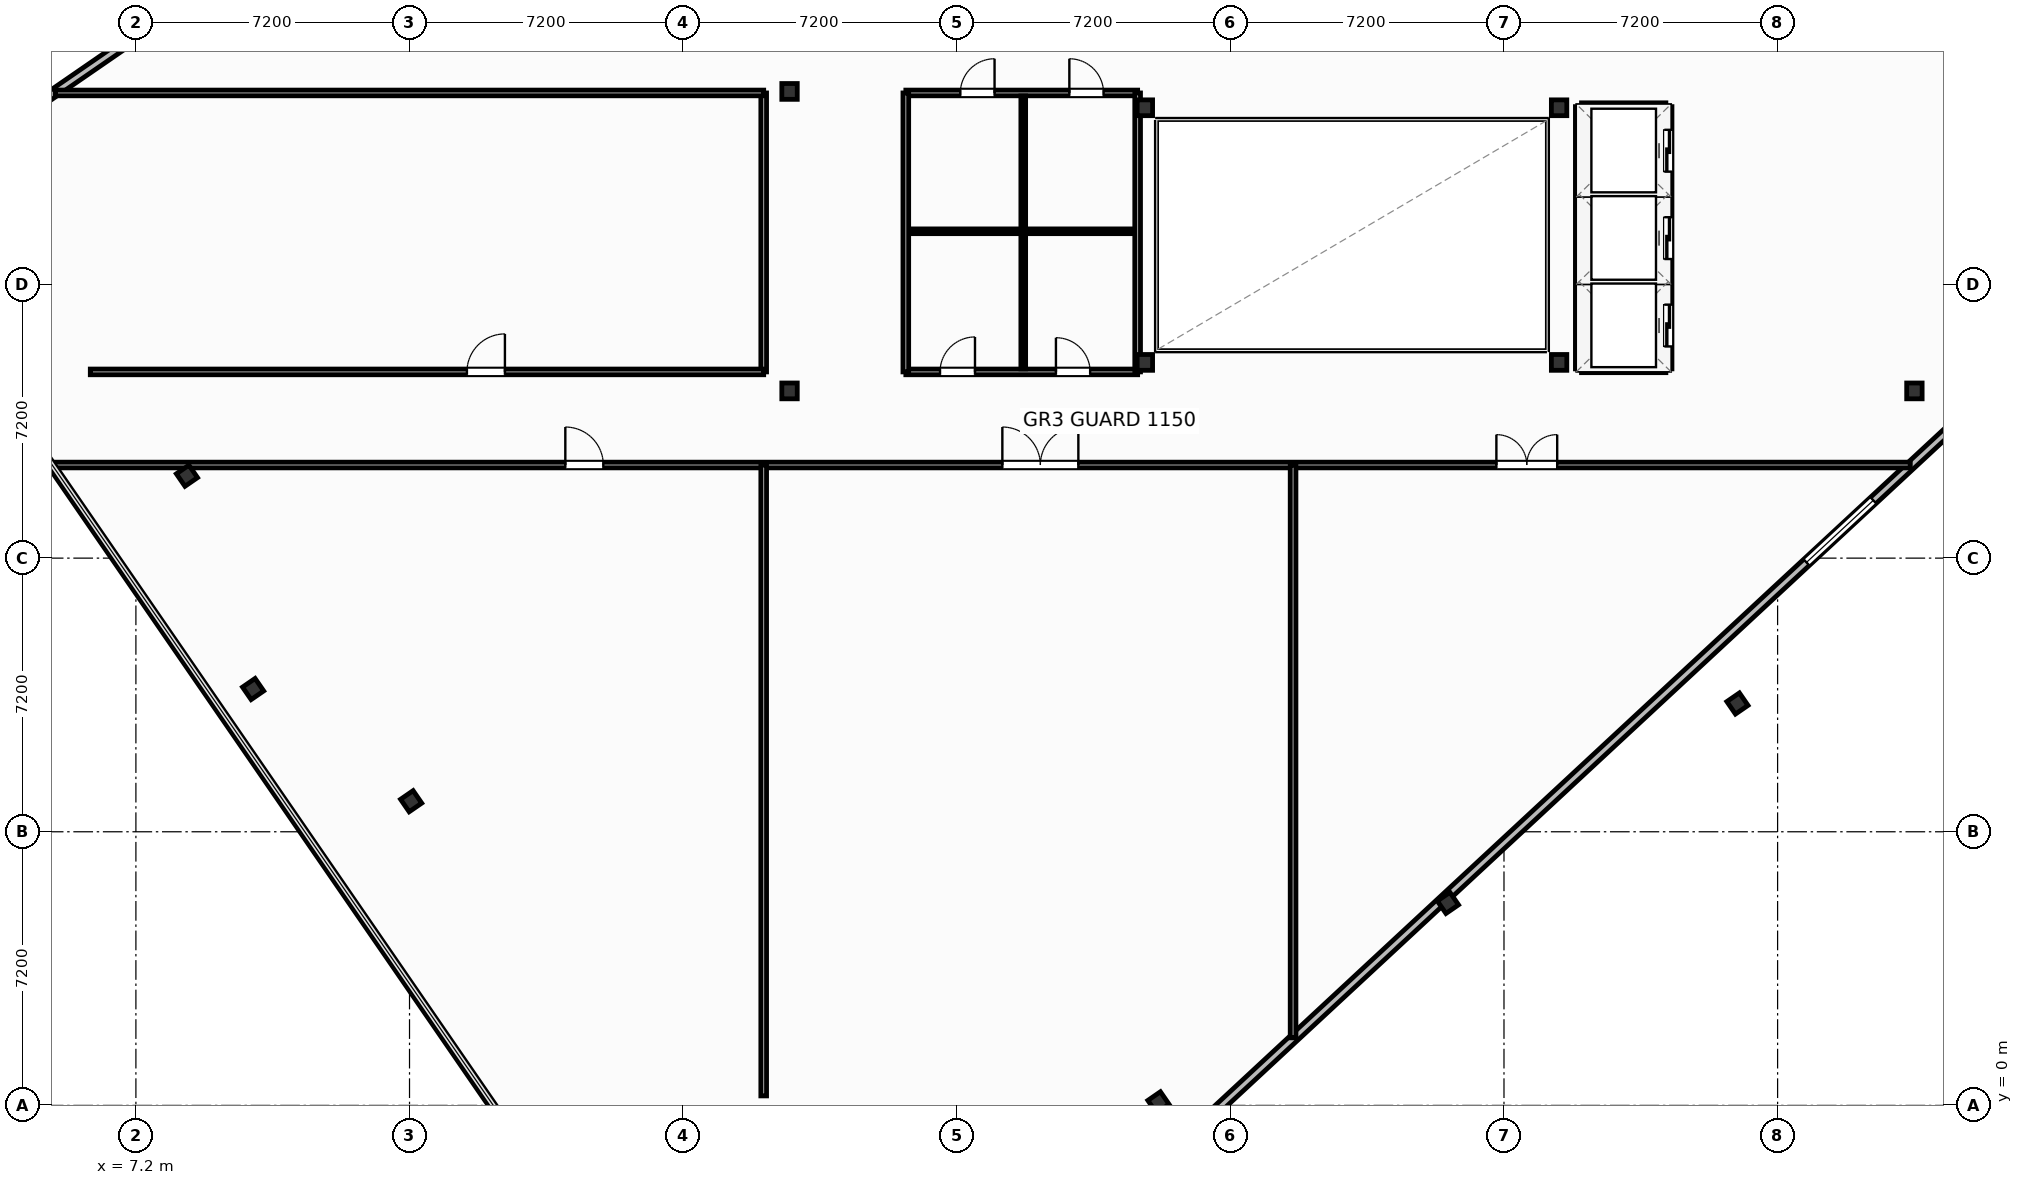
"""IFC4 building model, lengths in metres.
Left out: names, types, materials, properties, quantities, classifications, styles, units other than length and angle.
Written with IfcOpenShell. Run it as: python <this file> out.ifc"""

import sys

from ifc_helpers import new_model, si_unit, direction, frame, frame_2d, origin, origin_2d, place, context, subcontext, project, spatial, rectangle, i_section, extrude, element, fill, save


model = new_model("IFC4")
c1 = context("Model", 3, precision=1e-05, world=origin(), true_north=direction((0.0, 1.0)))
c2 = subcontext(c1, "Body", "Model", "MODEL_VIEW")
j1 = project(units=[si_unit("LENGTHUNIT", "METRE"), si_unit("PLANEANGLEUNIT", "RADIAN")], contexts=[c1])
p1 = place(None, origin())
s1 = spatial("IfcSite", under=j1, at=p1, CompositionType="ELEMENT")
p2 = place(p1, origin())
s2 = spatial("IfcBuilding", under=s1, at=p2, CompositionType="ELEMENT")
p3 = place(p2, frame((0.0, 0.0, 291.5)))
s3 = spatial("IfcBuildingStorey", under=s2, at=p3, CompositionType="ELEMENT", Elevation=291.5)
for number, where, z_axis, x_axis in (
    (1, (33.75, 19.55, 0.0), (0.0, 0.0, 1.0), (1.0, 0.0, 0.0)),
    (2, (44.65, 19.55, 0.0), (0.0, 0.0, 1.0), (1.0, 0.0, 0.0)),
    (3, (33.75, 26.25, 0.0), (0.0, 0.0, 1.0), (1.0, 0.0, 0.0)),
    (4, (44.65, 26.25, 0.0), (0.0, 0.0, 1.0), (1.0, 0.0, 0.0)),
    (5, (24.4, 18.8, 0.0), (0.0, 0.0, 1.0), (1.0, 0.0, 0.0)),
    (6, (24.4, 26.68, 0.0), (0.0, 0.0, 1.0), (1.0, 0.0, 0.0)),
    (7, (54.0, 18.8, 0.0), (0.0, 0.0, 1.0), (1.0, 0.0, 0.0)),
):
    element("IfcColumn", number, at=place(p3, frame(where, z_axis=z_axis, x_axis=x_axis)), inside=s3, PredefinedType="COLUMN", context=c2, shape_type="SweptSolid", body=[
        extrude(i_section(OverallWidth=0.406, OverallDepth=0.416, WebThickness=0.03, FlangeThickness=0.048, FilletRadius=0.025, at=origin_2d()), origin(), (0.0, 0.0, 1.0), 4.8),
    ])
for number, where, z_axis, x_axis in (
    (8, (34.107, 0.081, 0.0), (0.0, 0.0, 1.0), (0.824, 0.567, 0.0)),
    (9, (41.725, 5.328, 0.0), (0.0, 0.0, 1.0), (0.824, 0.567, 0.0)),
    (10, (49.343, 10.575, 0.0), (0.0, 0.0, 1.0), (0.824, 0.567, 0.0)),
    (11, (8.543, 16.569, 0.0), (0.0, 0.0, 1.0), (0.824, 0.567, 0.0)),
    (12, (10.284, 10.956, 0.0), (0.0, 0.0, 1.0), (0.824, 0.567, 0.0)),
    (13, (14.443, 8.004, 0.0), (0.0, 0.0, 1.0), (0.824, 0.567, 0.0)),
):
    element("IfcColumn", number, at=place(p3, frame(where, z_axis=z_axis, x_axis=x_axis)), inside=s3, PredefinedType="COLUMN", context=c2, shape_type="SweptSolid", body=[
        extrude(i_section(OverallWidth=0.401, OverallDepth=0.399, WebThickness=0.025, FlangeThickness=0.04, FilletRadius=0.022, at=origin_2d()), origin(), (0.0, 0.0, 1.0), 4.8),
    ])
p4 = place(p3, frame((27.693, -7.489, 0.0), z_axis=(0.0, 0.0, 1.0), x_axis=(0.733009701217, 0.680218184057, 0.0)))
e14 = element("IfcWall", 14, at=p4, inside=s3, PredefinedType="SOLIDWALL", context=c2, shape_type="SweptSolid", body=[
    extrude(rectangle(XDim=66.428, YDim=0.22, at=frame_2d((33.214, 0.0))), origin(), (0.0, 0.0, 1.0), 2.265),
])
p5 = place(p4, frame((32.014, 0.0, 0.8)))
e15 = element("IfcOpeningElement", 15, at=p5, cuts=e14, PredefinedType="OPENING", context=c2, shape_type="SweptSolid", body=[
    extrude(rectangle(XDim=2.4, YDim=1.385, at=frame_2d((1.2, 0.692))), frame((0.0, 0.12, 0.0), z_axis=(0.0, -1.0, 0.0), x_axis=(1.0, 0.0, 0.0)), (0.0, 0.0, 1.0), 0.24),
])
p6 = place(p3, frame((50.695, 58.086, 0.0), z_axis=(0.0, 0.0, 1.0), x_axis=(-0.823531024939, -0.567271232272, 0.0)))
e16 = element("IfcWall", 16, at=p6, inside=s3, PredefinedType="SOLIDWALL", context=c2, shape_type="SweptSolid", body=[
    extrude(rectangle(XDim=56.157, YDim=0.22, at=frame_2d((28.079, 0.0))), origin(), (0.0, 0.0, 1.0), 3.76),
])
p7 = place(p6, frame((26.879, 0.0, 0.8)))
e17 = element("IfcOpeningElement", 17, at=p7, cuts=e16, PredefinedType="OPENING", context=c2, shape_type="SweptSolid", body=[
    extrude(rectangle(XDim=2.4, YDim=1.85, at=frame_2d((1.2, 0.925))), frame((0.0, 0.12, 0.0), z_axis=(0.0, -1.0, 0.0), x_axis=(1.0, 0.0, 0.0)), (0.0, 0.0, 1.0), 0.24),
])
p8 = place(p3, frame((27.46, 26.64, 0.0), z_axis=(0.0, 0.0, 1.0), x_axis=(1.0, 0.0, 0.0)))
e18 = element("IfcWall", 18, at=p8, inside=s3, PredefinedType="PARTITIONING", context=c2, shape_type="SweptSolid", body=[
    extrude(rectangle(XDim=6.1, YDim=0.15, at=frame_2d((3.05, 0.0))), origin(), (0.0, 0.0, 1.0), 3.692),
])
p9 = place(p8, frame((4.303, 0.0, 0.0)))
e19 = element("IfcOpeningElement", 19, at=p9, cuts=e18, PredefinedType="OPENING", context=c2, shape_type="SweptSolid", body=[
    extrude(rectangle(XDim=0.9, YDim=2.05, at=frame_2d((0.45, 1.025))), frame((0.0, 0.085, 0.0), z_axis=(0.0, -1.0, 0.0), x_axis=(1.0, 0.0, 0.0)), (0.0, 0.0, 1.0), 0.17),
])
p10 = place(p8, frame((1.435, 0.0, 0.0)))
e20 = element("IfcOpeningElement", 20, at=p10, cuts=e18, PredefinedType="OPENING", context=c2, shape_type="SweptSolid", body=[
    extrude(rectangle(XDim=0.9, YDim=2.05, at=frame_2d((0.45, 1.025))), frame((0.0, 0.085, 0.0), z_axis=(0.0, -1.0, 0.0), x_axis=(1.0, 0.0, 0.0)), (0.0, 0.0, 1.0), 0.17),
])
p11 = place(p3, frame((27.46, 19.3, 0.0), z_axis=(0.0, 0.0, 1.0), x_axis=(1.0, 0.0, 0.0)))
e21 = element("IfcWall", 21, at=p11, inside=s3, PredefinedType="PARTITIONING", context=c2, shape_type="SweptSolid", body=[
    extrude(rectangle(XDim=6.1, YDim=0.15, at=frame_2d((3.05, 0.0))), origin(), (0.0, 0.0, 1.0), 3.692),
])
p12 = place(p11, frame((0.9, 0.0, 0.0)))
e22 = element("IfcOpeningElement", 22, at=p12, cuts=e21, PredefinedType="OPENING", context=c2, shape_type="SweptSolid", body=[
    extrude(rectangle(XDim=0.92, YDim=2.05, at=frame_2d((0.46, 1.025))), frame((0.0, 0.085, 0.0), z_axis=(0.0, -1.0, 0.0), x_axis=(1.0, 0.0, 0.0)), (0.0, 0.0, 1.0), 0.17),
])
p13 = place(p11, frame((3.95, 0.0, 0.0)))
e23 = element("IfcOpeningElement", 23, at=p13, cuts=e21, PredefinedType="OPENING", context=c2, shape_type="SweptSolid", body=[
    extrude(rectangle(XDim=0.9, YDim=2.05, at=frame_2d((0.45, 1.025))), frame((0.0, 0.085, 0.0), z_axis=(0.0, -1.0, 0.0), x_axis=(1.0, 0.0, 0.0)), (0.0, 0.0, 1.0), 0.17),
])
p14 = place(p3, frame((30.55, 19.38, 0.0), z_axis=(0.0, 0.0, 1.0), x_axis=(0.0, 1.0, 0.0)))
e24 = element("IfcWall", 24, at=p14, inside=s3, PredefinedType="PARTITIONING", context=c2, shape_type="SweptSolid", body=[
    extrude(rectangle(XDim=7.18, YDim=0.125, at=frame_2d((3.59, 0.0))), origin(), (0.0, 0.0, 1.0), 4.48),
])
p15 = place(p3, frame((27.52, 23.0, 0.0), z_axis=(0.0, 0.0, 1.0), x_axis=(1.0, 0.0, 0.0)))
e25 = element("IfcWall", 25, at=p15, inside=s3, PredefinedType="PARTITIONING", context=c2, shape_type="SweptSolid", body=[
    extrude(rectangle(XDim=6.0, YDim=0.125, at=frame_2d((3.0, 0.0))), origin(), (0.0, 0.0, 1.0), 4.48),
])
p16 = place(p3, frame((27.46, 19.3, 0.0), z_axis=(0.0, 0.0, 1.0), x_axis=(0.0, 1.0, 0.0)))
e26 = element("IfcWall", 26, at=p16, inside=s3, PredefinedType="PARTITIONING", context=c2, shape_type="SweptSolid", body=[
    extrude(rectangle(XDim=7.34, YDim=0.15, at=frame_2d((3.67, 0.0))), origin(), (0.0, 0.0, 1.0), 4.48),
])
p17 = place(p3, frame((33.56, 19.3, 0.0), z_axis=(0.0, 0.0, 1.0), x_axis=(0.0, 1.0, 0.0)))
e27 = element("IfcWall", 27, at=p17, inside=s3, PredefinedType="PARTITIONING", context=c2, shape_type="SweptSolid", body=[
    extrude(rectangle(XDim=7.34, YDim=0.15, at=frame_2d((3.67, 0.0))), origin(), (0.0, 0.0, 1.0), 2.265),
])
p18 = place(p3, frame((5.038, 16.85, 0.0), z_axis=(0.0, 0.0, 1.0), x_axis=(1.0, 0.0, 0.0)))
e28 = element("IfcWall", 28, at=p18, inside=s3, PredefinedType="PARTITIONING", context=c2, shape_type="SweptSolid", body=[
    extrude(rectangle(XDim=48.854, YDim=0.15, at=frame_2d((24.427, 0.0))), origin(), (0.0, 0.0, 1.0), 2.265),
])
p19 = place(p18, frame((13.462, 0.0, 0.0)))
e29 = element("IfcOpeningElement", 29, at=p19, cuts=e28, PredefinedType="OPENING", context=c2, shape_type="SweptSolid", body=[
    extrude(rectangle(XDim=1.0, YDim=2.05, at=frame_2d((0.5, 1.025))), frame((0.0, 0.085, 0.0), z_axis=(0.0, -1.0, 0.0), x_axis=(1.0, 0.0, 0.0)), (0.0, 0.0, 1.0), 0.17),
])
p20 = place(p18, frame((24.962, 0.0, 0.0)))
e30 = element("IfcOpeningElement", 30, at=p20, cuts=e28, PredefinedType="OPENING", context=c2, shape_type="SweptSolid", body=[
    extrude(rectangle(XDim=2.0, YDim=2.05, at=frame_2d((1.0, 1.025))), frame((0.0, 0.085, 0.0), z_axis=(0.0, -1.0, 0.0), x_axis=(1.0, 0.0, 0.0)), (0.0, 0.0, 1.0), 0.17),
])
p21 = place(p18, frame((37.962, 0.0, 0.0)))
e31 = element("IfcOpeningElement", 31, at=p21, cuts=e28, PredefinedType="OPENING", context=c2, shape_type="SweptSolid", body=[
    extrude(rectangle(XDim=1.6, YDim=2.05, at=frame_2d((0.8, 1.025))), frame((0.0, 0.085, 0.0), z_axis=(0.0, -1.0, 0.0), x_axis=(1.0, 0.0, 0.0)), (0.0, 0.0, 1.0), 0.17),
])
p22 = place(p3, frame((23.72, 0.25, 0.0), z_axis=(0.0, 0.0, 1.0), x_axis=(0.0, 1.0, 0.0)))
e32 = element("IfcWall", 32, at=p22, inside=s3, PredefinedType="PARTITIONING", context=c2, shape_type="SweptSolid", body=[
    extrude(rectangle(XDim=16.6, YDim=0.15, at=frame_2d((8.3, 0.0))), origin(), (0.0, 0.0, 1.0), 4.48),
])
p23 = place(p3, frame((23.72, 19.3, 0.0), z_axis=(0.0, 0.0, 1.0), x_axis=(0.0, 1.0, 0.0)))
e33 = element("IfcWall", 33, at=p23, inside=s3, PredefinedType="PARTITIONING", context=c2, shape_type="SweptSolid", body=[
    extrude(rectangle(XDim=7.34, YDim=0.15, at=frame_2d((3.67, 0.0))), origin(), (0.0, 0.0, 1.0), 4.48),
])
p24 = place(p3, frame((6.0, 19.3, 0.0), z_axis=(0.0, 0.0, 1.0), x_axis=(1.0, 0.0, 0.0)))
e34 = element("IfcWall", 34, at=p24, inside=s3, PredefinedType="PARTITIONING", context=c2, shape_type="SweptSolid", body=[
    extrude(rectangle(XDim=17.72, YDim=0.15, at=frame_2d((8.86, 0.0))), origin(), (0.0, 0.0, 1.0), 4.48),
])
p25 = place(p24, frame((9.91, 0.0, 0.0)))
e35 = element("IfcOpeningElement", 35, at=p25, cuts=e34, PredefinedType="OPENING", context=c2, shape_type="SweptSolid", body=[
    extrude(rectangle(XDim=1.0, YDim=2.05, at=frame_2d((0.5, 1.025))), frame((0.0, 0.085, 0.0), z_axis=(0.0, -1.0, 0.0), x_axis=(1.0, 0.0, 0.0)), (0.0, 0.0, 1.0), 0.17),
])
p26 = place(p3, frame((37.65, 1.778, 0.0), z_axis=(0.0, 0.0, 1.0), x_axis=(0.0, 1.0, 0.0)))
e36 = element("IfcWall", 36, at=p26, inside=s3, PredefinedType="PARTITIONING", context=c2, shape_type="SweptSolid", body=[
    extrude(rectangle(XDim=15.072, YDim=0.15, at=frame_2d((7.536, 0.0))), origin(), (0.0, 0.0, 1.0), 4.48),
])
p27 = place(p3, frame((5.078, 26.64, 0.0), z_axis=(0.0, 0.0, 1.0), x_axis=(1.0, 0.0, 0.0)))
e37 = element("IfcWall", 37, at=p27, inside=s3, PredefinedType="PARTITIONING", context=c2, shape_type="SweptSolid", body=[
    extrude(rectangle(XDim=18.642, YDim=0.15, at=frame_2d((9.321, 0.0))), origin(), (0.0, 0.0, 1.0), 2.265),
])
for number, where, z_axis, x_axis in (
    (38, (45.24, 21.675, 0.0), (0.0, 0.0, 1.0), (1.0, 0.0, 0.0)),
    (39, (45.24, 23.975, 0.0), (0.0, 0.0, 1.0), (1.0, 0.0, 0.0)),
):
    element("IfcWall", number, at=place(p3, frame(where, z_axis=z_axis, x_axis=x_axis)), inside=s3, PredefinedType="PARTITIONING", context=c2, shape_type="SweptSolid", body=[
        extrude(rectangle(XDim=2.22, YDim=0.2, at=frame_2d((1.11, 0.0))), origin(), (0.0, 0.0, 1.0), 4.48),
    ])
p28 = place(p3, frame((45.24, 19.38, 0.0), z_axis=(0.0, 0.0, 1.0), x_axis=(1.0, 0.0, 0.0)))
e40 = element("IfcWall", 40, at=p28, inside=s3, PredefinedType="PARTITIONING", context=c2, shape_type="SweptSolid", body=[
    extrude(rectangle(XDim=2.22, YDim=0.2, at=frame_2d((1.11, 0.0))), origin(), (0.0, 0.0, 1.0), 3.692),
])
p29 = place(p3, frame((45.24, 26.28, 0.0), z_axis=(0.0, 0.0, 1.0), x_axis=(1.0, 0.0, 0.0)))
e41 = element("IfcWall", 41, at=p29, inside=s3, PredefinedType="PARTITIONING", context=c2, shape_type="SweptSolid", body=[
    extrude(rectangle(XDim=2.22, YDim=0.2, at=frame_2d((1.11, 0.0))), origin(), (0.0, 0.0, 1.0), 4.48),
])
p30 = place(p3, frame((45.18, 19.38, 0.0), z_axis=(0.0, 0.0, 1.0), x_axis=(0.0, 1.0, 0.0)))
e42 = element("IfcWall", 42, at=p30, inside=s3, PredefinedType="PARTITIONING", context=c2, shape_type="SweptSolid", body=[
    extrude(rectangle(XDim=6.9, YDim=0.2, at=frame_2d((3.45, 0.0))), origin(), (0.0, 0.0, 1.0), 4.48),
])
p31 = place(p3, frame((47.52, 19.38, 0.0), z_axis=(0.0, 0.0, 1.0), x_axis=(0.0, 1.0, 0.0)))
e43 = element("IfcWall", 43, at=p31, inside=s3, PredefinedType="PARTITIONING", context=c2, shape_type="SweptSolid", body=[
    extrude(rectangle(XDim=6.9, YDim=0.2, at=frame_2d((3.45, 0.0))), origin(), (0.0, 0.0, 1.0), 4.48),
])
p32 = place(p31, frame((0.59, 0.0, 0.0)))
e44 = element("IfcOpeningElement", 44, at=p32, cuts=e43, PredefinedType="OPENING", context=c2, shape_type="SweptSolid", body=[
    extrude(rectangle(XDim=1.1, YDim=2.15, at=frame_2d((0.55, 1.075))), frame((0.0, 0.11, 0.0), z_axis=(0.0, -1.0, 0.0), x_axis=(1.0, 0.0, 0.0)), (0.0, 0.0, 1.0), 0.22),
])
p33 = place(p31, frame((2.89, 0.0, 0.0)))
e45 = element("IfcOpeningElement", 45, at=p33, cuts=e43, PredefinedType="OPENING", context=c2, shape_type="SweptSolid", body=[
    extrude(rectangle(XDim=1.1, YDim=2.15, at=frame_2d((0.55, 1.075))), frame((0.0, 0.11, 0.0), z_axis=(0.0, -1.0, 0.0), x_axis=(1.0, 0.0, 0.0)), (0.0, 0.0, 1.0), 0.22),
])
p34 = place(p31, frame((5.19, 0.0, 0.0)))
e46 = element("IfcOpeningElement", 46, at=p34, cuts=e43, PredefinedType="OPENING", context=c2, shape_type="SweptSolid", body=[
    extrude(rectangle(XDim=1.1, YDim=2.15, at=frame_2d((0.55, 1.075))), frame((0.0, 0.11, 0.0), z_axis=(0.0, -1.0, 0.0), x_axis=(1.0, 0.0, 0.0)), (0.0, 0.0, 1.0), 0.22),
])
p35 = place(p5, origin())
e47 = element("IfcWindow", 47, at=p35, inside=s3, PartitioningType="SINGLE_PANEL", PredefinedType="WINDOW", context=c2, shape_type="SweptSolid", body=[
    extrude(rectangle(XDim=2.4, YDim=1.385, at=frame_2d((1.2, 0.692))), frame((0.0, 0.03, 0.0), z_axis=(0.0, -1.0, 0.0), x_axis=(1.0, 0.0, 0.0)), (0.0, 0.0, 1.0), 0.06),
])
fill(e15, e47)
p36 = place(p9, origin())
e48 = element("IfcDoor", 48, at=p36, inside=s3, OperationType="SINGLE_SWING_LEFT", PredefinedType="DOOR", context=c2, shape_type="SweptSolid", body=[
    extrude(rectangle(XDim=0.9, YDim=2.05, at=frame_2d((0.45, 1.025))), frame((0.0, 0.025, 0.0), z_axis=(0.0, -1.0, 0.0), x_axis=(1.0, 0.0, 0.0)), (0.0, 0.0, 1.0), 0.05),
])
fill(e19, e48)
p37 = place(p10, origin())
e49 = element("IfcDoor", 49, at=p37, inside=s3, OperationType="SINGLE_SWING_RIGHT", PredefinedType="DOOR", context=c2, shape_type="SweptSolid", body=[
    extrude(rectangle(XDim=0.9, YDim=2.05, at=frame_2d((0.45, 1.025))), frame((0.0, 0.025, 0.0), z_axis=(0.0, -1.0, 0.0), x_axis=(1.0, 0.0, 0.0)), (0.0, 0.0, 1.0), 0.05),
])
fill(e20, e49)
p38 = place(p12, origin())
e50 = element("IfcDoor", 50, at=p38, inside=s3, OperationType="SINGLE_SWING_RIGHT", PredefinedType="DOOR", context=c2, shape_type="SweptSolid", body=[
    extrude(rectangle(XDim=0.92, YDim=2.05, at=frame_2d((0.46, 1.025))), frame((0.0, 0.025, 0.0), z_axis=(0.0, -1.0, 0.0), x_axis=(1.0, 0.0, 0.0)), (0.0, 0.0, 1.0), 0.05),
])
fill(e22, e50)
p39 = place(p13, origin())
e51 = element("IfcDoor", 51, at=p39, inside=s3, OperationType="SINGLE_SWING_LEFT", PredefinedType="DOOR", context=c2, shape_type="SweptSolid", body=[
    extrude(rectangle(XDim=0.9, YDim=2.05, at=frame_2d((0.45, 1.025))), frame((0.0, 0.025, 0.0), z_axis=(0.0, -1.0, 0.0), x_axis=(1.0, 0.0, 0.0)), (0.0, 0.0, 1.0), 0.05),
])
fill(e23, e51)
p40 = place(p19, origin())
e52 = element("IfcDoor", 52, at=p40, inside=s3, OperationType="SINGLE_SWING_LEFT", PredefinedType="DOOR", context=c2, shape_type="SweptSolid", body=[
    extrude(rectangle(XDim=1.0, YDim=2.05, at=frame_2d((0.5, 1.025))), frame((0.0, 0.025, 0.0), z_axis=(0.0, -1.0, 0.0), x_axis=(1.0, 0.0, 0.0)), (0.0, 0.0, 1.0), 0.05),
])
fill(e29, e52)
p41 = place(p20, origin())
e53 = element("IfcDoor", 53, at=p41, inside=s3, OperationType="DOUBLE_DOOR_SINGLE_SWING", PredefinedType="DOOR", context=c2, shape_type="SweptSolid", body=[
    extrude(rectangle(XDim=2.0, YDim=2.05, at=frame_2d((1.0, 1.025))), frame((0.0, 0.025, 0.0), z_axis=(0.0, -1.0, 0.0), x_axis=(1.0, 0.0, 0.0)), (0.0, 0.0, 1.0), 0.05),
])
fill(e30, e53)
p42 = place(p21, origin())
e54 = element("IfcDoor", 54, at=p42, inside=s3, OperationType="DOUBLE_DOOR_SINGLE_SWING", PredefinedType="DOOR", context=c2, shape_type="SweptSolid", body=[
    extrude(rectangle(XDim=1.6, YDim=2.05, at=frame_2d((0.8, 1.025))), frame((0.0, 0.025, 0.0), z_axis=(0.0, -1.0, 0.0), x_axis=(1.0, 0.0, 0.0)), (0.0, 0.0, 1.0), 0.05),
])
fill(e31, e54)
p43 = place(p25, origin())
e55 = element("IfcDoor", 55, at=p43, inside=s3, OperationType="SINGLE_SWING_RIGHT", PredefinedType="DOOR", context=c2, shape_type="SweptSolid", body=[
    extrude(rectangle(XDim=1.0, YDim=2.05, at=frame_2d((0.5, 1.025))), frame((0.0, 0.025, 0.0), z_axis=(0.0, -1.0, 0.0), x_axis=(1.0, 0.0, 0.0)), (0.0, 0.0, 1.0), 0.05),
])
fill(e35, e55)
p44 = place(p32, origin())
e56 = element("IfcDoor", 56, at=p44, inside=s3, OperationType="SLIDING_TO_LEFT", PredefinedType="DOOR", context=c2, shape_type="SweptSolid", body=[
    extrude(rectangle(XDim=1.1, YDim=2.15, at=frame_2d((0.55, 1.075))), frame((0.0, 0.025, 0.0), z_axis=(0.0, -1.0, 0.0), x_axis=(1.0, 0.0, 0.0)), (0.0, 0.0, 1.0), 0.05),
])
fill(e44, e56)
p45 = place(p33, origin())
e57 = element("IfcDoor", 57, at=p45, inside=s3, OperationType="SLIDING_TO_LEFT", PredefinedType="DOOR", context=c2, shape_type="SweptSolid", body=[
    extrude(rectangle(XDim=1.1, YDim=2.15, at=frame_2d((0.55, 1.075))), frame((0.0, 0.025, 0.0), z_axis=(0.0, -1.0, 0.0), x_axis=(1.0, 0.0, 0.0)), (0.0, 0.0, 1.0), 0.05),
])
fill(e45, e57)
p46 = place(p34, origin())
e58 = element("IfcDoor", 58, at=p46, inside=s3, OperationType="SLIDING_TO_LEFT", PredefinedType="DOOR", context=c2, shape_type="SweptSolid", body=[
    extrude(rectangle(XDim=1.1, YDim=2.15, at=frame_2d((0.55, 1.075))), frame((0.0, 0.025, 0.0), z_axis=(0.0, -1.0, 0.0), x_axis=(1.0, 0.0, 0.0)), (0.0, 0.0, 1.0), 0.05),
])
fill(e46, e58)
save(model, sys.argv[1])
